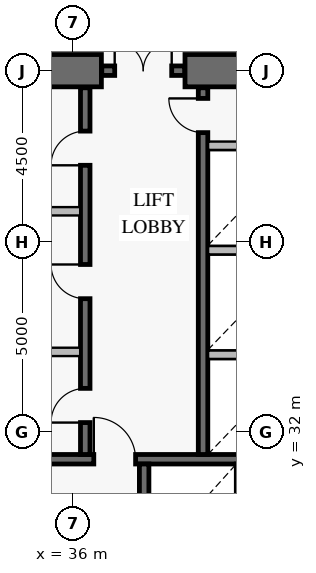
"""IFC4 building model, lengths in metres.
Left out: names, types, materials, properties, quantities, classifications, styles, units other than length and angle.
Written with IfcOpenShell. Run it as: python <this file> out.ifc"""

import sys

from ifc_helpers import new_model, si_unit, direction, frame, frame_2d, origin, place, context, subcontext, project, spatial, rectangle, extrude, element, fill, save


model = new_model("IFC4")
c1 = context("Model", 3, precision=1e-05, world=origin(), true_north=direction((0.0, 1.0)))
c2 = subcontext(c1, "Body", "Model", "MODEL_VIEW")
j1 = project(units=[si_unit("LENGTHUNIT", "METRE"), si_unit("PLANEANGLEUNIT", "RADIAN")], contexts=[c1])
p1 = place(None, origin())
s1 = spatial("IfcSite", under=j1, at=p1, CompositionType="ELEMENT")
p2 = place(p1, origin())
s2 = spatial("IfcBuilding", under=s1, at=p2, CompositionType="ELEMENT")
p3 = place(p2, frame((0.0, 0.0, 24.6)))
s3 = spatial("IfcBuildingStorey", under=s2, at=p3, CompositionType="ELEMENT", Elevation=24.6)
p4 = place(p3, frame((46.925, 41.5, 0.0), z_axis=(0.0, 0.0, 1.0), x_axis=(-1.0, 0.0, 0.0)))
e1 = element("IfcWall", 1, at=p4, inside=s3, PredefinedType="SHEAR", context=c2, shape_type="SweptSolid", body=[
    extrude(rectangle(XDim=7.975, YDim=0.85, at=frame_2d((3.988, 0.0))), origin(), (0.0, 0.0, 1.0), 4.2),
])
p5 = place(p3, frame((36.75, 41.5, 0.0), z_axis=(0.0, 0.0, 1.0), x_axis=(-1.0, 0.0, 0.0)))
e2 = element("IfcWall", 2, at=p5, inside=s3, PredefinedType="SHEAR", context=c2, shape_type="SweptSolid", body=[
    extrude(rectangle(XDim=11.675, YDim=0.85, at=frame_2d((5.837, 0.0))), origin(), (0.0, 0.0, 1.0), 4.2),
])
p6 = place(p5, frame((4.25, 0.0, 0.0)))
e3 = element("IfcOpeningElement", 3, at=p6, cuts=e2, PredefinedType="OPENING", context=c2, shape_type="SweptSolid", body=[
    extrude(rectangle(XDim=1.1, YDim=2.15, at=frame_2d((0.55, 1.075))), frame((0.0, 0.437, 0.0), z_axis=(0.0, -1.0, 0.0), x_axis=(1.0, 0.0, 0.0)), (0.0, 0.0, 1.0), 0.874),
])
p7 = place(p3, frame((36.76, 41.5, 0.0), z_axis=(0.0, 0.0, 1.0), x_axis=(1.0, 0.0, 0.0)))
e4 = element("IfcWall", 4, at=p7, inside=s3, PredefinedType="SOLIDWALL", context=c2, shape_type="SweptSolid", body=[
    extrude(rectangle(XDim=2.18, YDim=0.25, at=frame_2d((1.09, 0.0))), origin(), (0.0, 0.0, 1.0), 4.2),
])
p8 = place(p7, frame((0.34, 0.0, 0.0)))
e5 = element("IfcOpeningElement", 5, at=p8, cuts=e4, PredefinedType="OPENING", context=c2, shape_type="SweptSolid", body=[
    extrude(rectangle(XDim=1.5, YDim=2.15, at=frame_2d((0.75, 1.075))), frame((0.0, 0.137, 0.0), z_axis=(0.0, -1.0, 0.0), x_axis=(1.0, 0.0, 0.0)), (0.0, 0.0, 1.0), 0.274),
])
p9 = place(p3, frame((25.95, 31.275, 0.0), z_axis=(0.0, 0.0, 1.0), x_axis=(1.0, 0.0, 0.0)))
e6 = element("IfcWall", 6, at=p9, inside=s3, PredefinedType="SOLIDWALL", context=c2, shape_type="SweptSolid", body=[
    extrude(rectangle(XDim=20.1, YDim=0.25, at=frame_2d((10.05, 0.0))), origin(), (0.0, 0.0, 1.0), 4.2),
])
p10 = place(p9, frame((2.6, 0.0, 0.0)))
e7 = element("IfcOpeningElement", 7, at=p10, cuts=e6, PredefinedType="OPENING", context=c2, shape_type="SweptSolid", body=[
    extrude(rectangle(XDim=1.1, YDim=2.15, at=frame_2d((0.55, 1.075))), frame((0.0, 0.137, 0.0), z_axis=(0.0, -1.0, 0.0), x_axis=(1.0, 0.0, 0.0)), (0.0, 0.0, 1.0), 0.274),
])
p11 = place(p9, frame((10.6, 0.0, 0.0)))
e8 = element("IfcOpeningElement", 8, at=p11, cuts=e6, PredefinedType="OPENING", context=c2, shape_type="SweptSolid", body=[
    extrude(rectangle(XDim=1.1, YDim=2.15, at=frame_2d((0.55, 1.075))), frame((0.0, 0.137, 0.0), z_axis=(0.0, -1.0, 0.0), x_axis=(1.0, 0.0, 0.0)), (0.0, 0.0, 1.0), 0.274),
])
p12 = place(p9, frame((16.35, 0.0, 0.0)))
e9 = element("IfcOpeningElement", 9, at=p12, cuts=e6, PredefinedType="OPENING", context=c2, shape_type="SweptSolid", body=[
    extrude(rectangle(XDim=1.1, YDim=2.15, at=frame_2d((0.55, 1.075))), frame((0.0, 0.137, 0.0), z_axis=(0.0, -1.0, 0.0), x_axis=(1.0, 0.0, 0.0)), (0.0, 0.0, 1.0), 0.274),
])
p13 = place(p3, frame((36.325, 31.4, 0.0), z_axis=(0.0, 0.0, 1.0), x_axis=(0.0, 1.0, 0.0)))
e10 = element("IfcWall", 10, at=p13, inside=s3, PredefinedType="SOLIDWALL", context=c2, shape_type="SweptSolid", body=[
    extrude(rectangle(XDim=9.65, YDim=0.25, at=frame_2d((4.825, 0.0))), origin(), (0.0, 0.0, 1.0), 4.2),
])
p14 = place(p13, frame((0.84, 0.0, 0.0)))
e11 = element("IfcOpeningElement", 11, at=p14, cuts=e10, PredefinedType="OPENING", context=c2, shape_type="SweptSolid", body=[
    extrude(rectangle(XDim=0.9, YDim=2.1, at=frame_2d((0.45, 1.05))), frame((0.0, 0.137, 0.0), z_axis=(0.0, -1.0, 0.0), x_axis=(1.0, 0.0, 0.0)), (0.0, 0.0, 1.0), 0.274),
])
p15 = place(p13, frame((4.1, 0.0, 0.0)))
e12 = element("IfcOpeningElement", 12, at=p15, cuts=e10, PredefinedType="OPENING", context=c2, shape_type="SweptSolid", body=[
    extrude(rectangle(XDim=0.9, YDim=2.1, at=frame_2d((0.45, 1.05))), frame((0.0, 0.137, 0.0), z_axis=(0.0, -1.0, 0.0), x_axis=(1.0, 0.0, 0.0)), (0.0, 0.0, 1.0), 0.274),
])
p16 = place(p13, frame((7.61, 0.0, 0.0)))
e13 = element("IfcOpeningElement", 13, at=p16, cuts=e10, PredefinedType="OPENING", context=c2, shape_type="SweptSolid", body=[
    extrude(rectangle(XDim=0.9, YDim=2.1, at=frame_2d((0.45, 1.05))), frame((0.0, 0.137, 0.0), z_axis=(0.0, -1.0, 0.0), x_axis=(1.0, 0.0, 0.0)), (0.0, 0.0, 1.0), 0.274),
])
p17 = place(p3, frame((39.425, 31.4, 0.0), z_axis=(0.0, 0.0, 1.0), x_axis=(0.0, 1.0, 0.0)))
e14 = element("IfcWall", 14, at=p17, inside=s3, PredefinedType="SOLIDWALL", context=c2, shape_type="SweptSolid", body=[
    extrude(rectangle(XDim=9.65, YDim=0.25, at=frame_2d((4.825, 0.0))), origin(), (0.0, 0.0, 1.0), 4.2),
])
p18 = place(p17, frame((8.47, 0.0, 0.0)))
e15 = element("IfcOpeningElement", 15, at=p18, cuts=e14, PredefinedType="OPENING", context=c2, shape_type="SweptSolid", body=[
    extrude(rectangle(XDim=0.9, YDim=2.1, at=frame_2d((0.45, 1.05))), frame((0.0, 0.137, 0.0), z_axis=(0.0, -1.0, 0.0), x_axis=(1.0, 0.0, 0.0)), (0.0, 0.0, 1.0), 0.274),
])
p19 = place(p3, frame((37.875, 22.95, 0.0), z_axis=(0.0, 0.0, 1.0), x_axis=(0.0, 1.0, 0.0)))
e16 = element("IfcWall", 16, at=p19, inside=s3, PredefinedType="SOLIDWALL", context=c2, shape_type="SweptSolid", body=[
    extrude(rectangle(XDim=8.2, YDim=0.25, at=frame_2d((4.1, 0.0))), origin(), (0.0, 0.0, 1.0), 4.2),
])
for number, where, z_axis, x_axis in (
    (17, (34.108, 34.1, 0.0), (0.0, 0.0, 1.0), (1.0, 0.0, 0.0)),
    (18, (34.108, 37.8, 0.0), (0.0, 0.0, 1.0), (1.0, 0.0, 0.0)),
):
    element("IfcWall", number, at=place(p3, frame(where, z_axis=z_axis, x_axis=x_axis)), inside=s3, PredefinedType="PARTITIONING", context=c2, shape_type="SweptSolid", body=[
        extrude(rectangle(XDim=2.084, YDim=0.22, at=frame_2d((1.042, 0.0))), origin(), (0.0, 0.0, 1.0), 3.92),
    ])
for number, where, z_axis, x_axis in (
    (19, (39.558, 34.025, 0.0), (0.0, 0.0, 1.0), (1.0, 0.0, 0.0)),
    (20, (39.558, 36.775, 0.0), (0.0, 0.0, 1.0), (1.0, 0.0, 0.0)),
    (21, (39.558, 39.525, 0.0), (0.0, 0.0, 1.0), (1.0, 0.0, 0.0)),
):
    element("IfcWall", number, at=place(p3, frame(where, z_axis=z_axis, x_axis=x_axis)), inside=s3, PredefinedType="PARTITIONING", context=c2, shape_type="SweptSolid", body=[
        extrude(rectangle(XDim=2.384, YDim=0.22, at=frame_2d((1.192, 0.0))), origin(), (0.0, 0.0, 1.0), 3.92),
    ])
p20 = place(p8, origin())
e22 = element("IfcDoor", 22, at=p20, inside=s3, OperationType="DOUBLE_DOOR_SINGLE_SWING", PredefinedType="DOOR", context=c2, shape_type="SweptSolid", body=[
    extrude(rectangle(XDim=1.5, YDim=2.15, at=frame_2d((0.75, 1.075))), frame((0.0, 0.025, 0.0), z_axis=(0.0, -1.0, 0.0), x_axis=(1.0, 0.0, 0.0)), (0.0, 0.0, 1.0), 0.05),
])
fill(e5, e22)
p21 = place(p11, origin())
e23 = element("IfcDoor", 23, at=p21, inside=s3, OperationType="SINGLE_SWING_LEFT", PredefinedType="USERDEFINED", context=c2, shape_type="SweptSolid", body=[
    extrude(rectangle(XDim=1.1, YDim=2.15, at=frame_2d((0.55, 1.075))), frame((0.0, 0.025, 0.0), z_axis=(0.0, -1.0, 0.0), x_axis=(1.0, 0.0, 0.0)), (0.0, 0.0, 1.0), 0.05),
])
fill(e8, e23)
p22 = place(p14, origin())
e24 = element("IfcDoor", 24, at=p22, inside=s3, OperationType="SINGLE_SWING_LEFT", PredefinedType="DOOR", context=c2, shape_type="SweptSolid", body=[
    extrude(rectangle(XDim=0.9, YDim=2.1, at=frame_2d((0.45, 1.05))), frame((0.0, 0.025, 0.0), z_axis=(0.0, -1.0, 0.0), x_axis=(1.0, 0.0, 0.0)), (0.0, 0.0, 1.0), 0.05),
])
fill(e11, e24)
p23 = place(p15, origin())
e25 = element("IfcDoor", 25, at=p23, inside=s3, OperationType="SINGLE_SWING_RIGHT", PredefinedType="DOOR", context=c2, shape_type="SweptSolid", body=[
    extrude(rectangle(XDim=0.9, YDim=2.1, at=frame_2d((0.45, 1.05))), frame((0.0, 0.025, 0.0), z_axis=(0.0, -1.0, 0.0), x_axis=(1.0, 0.0, 0.0)), (0.0, 0.0, 1.0), 0.05),
])
fill(e12, e25)
p24 = place(p16, origin())
e26 = element("IfcDoor", 26, at=p24, inside=s3, OperationType="SINGLE_SWING_LEFT", PredefinedType="DOOR", context=c2, shape_type="SweptSolid", body=[
    extrude(rectangle(XDim=0.9, YDim=2.1, at=frame_2d((0.45, 1.05))), frame((0.0, 0.025, 0.0), z_axis=(0.0, -1.0, 0.0), x_axis=(1.0, 0.0, 0.0)), (0.0, 0.0, 1.0), 0.05),
])
fill(e13, e26)
p25 = place(p18, origin())
e27 = element("IfcDoor", 27, at=p25, inside=s3, OperationType="SINGLE_SWING_RIGHT", PredefinedType="DOOR", context=c2, shape_type="SweptSolid", body=[
    extrude(rectangle(XDim=0.9, YDim=2.1, at=frame_2d((0.45, 1.05))), frame((0.0, 0.025, 0.0), z_axis=(0.0, -1.0, 0.0), x_axis=(1.0, 0.0, 0.0)), (0.0, 0.0, 1.0), 0.05),
])
fill(e15, e27)
save(model, sys.argv[1])
